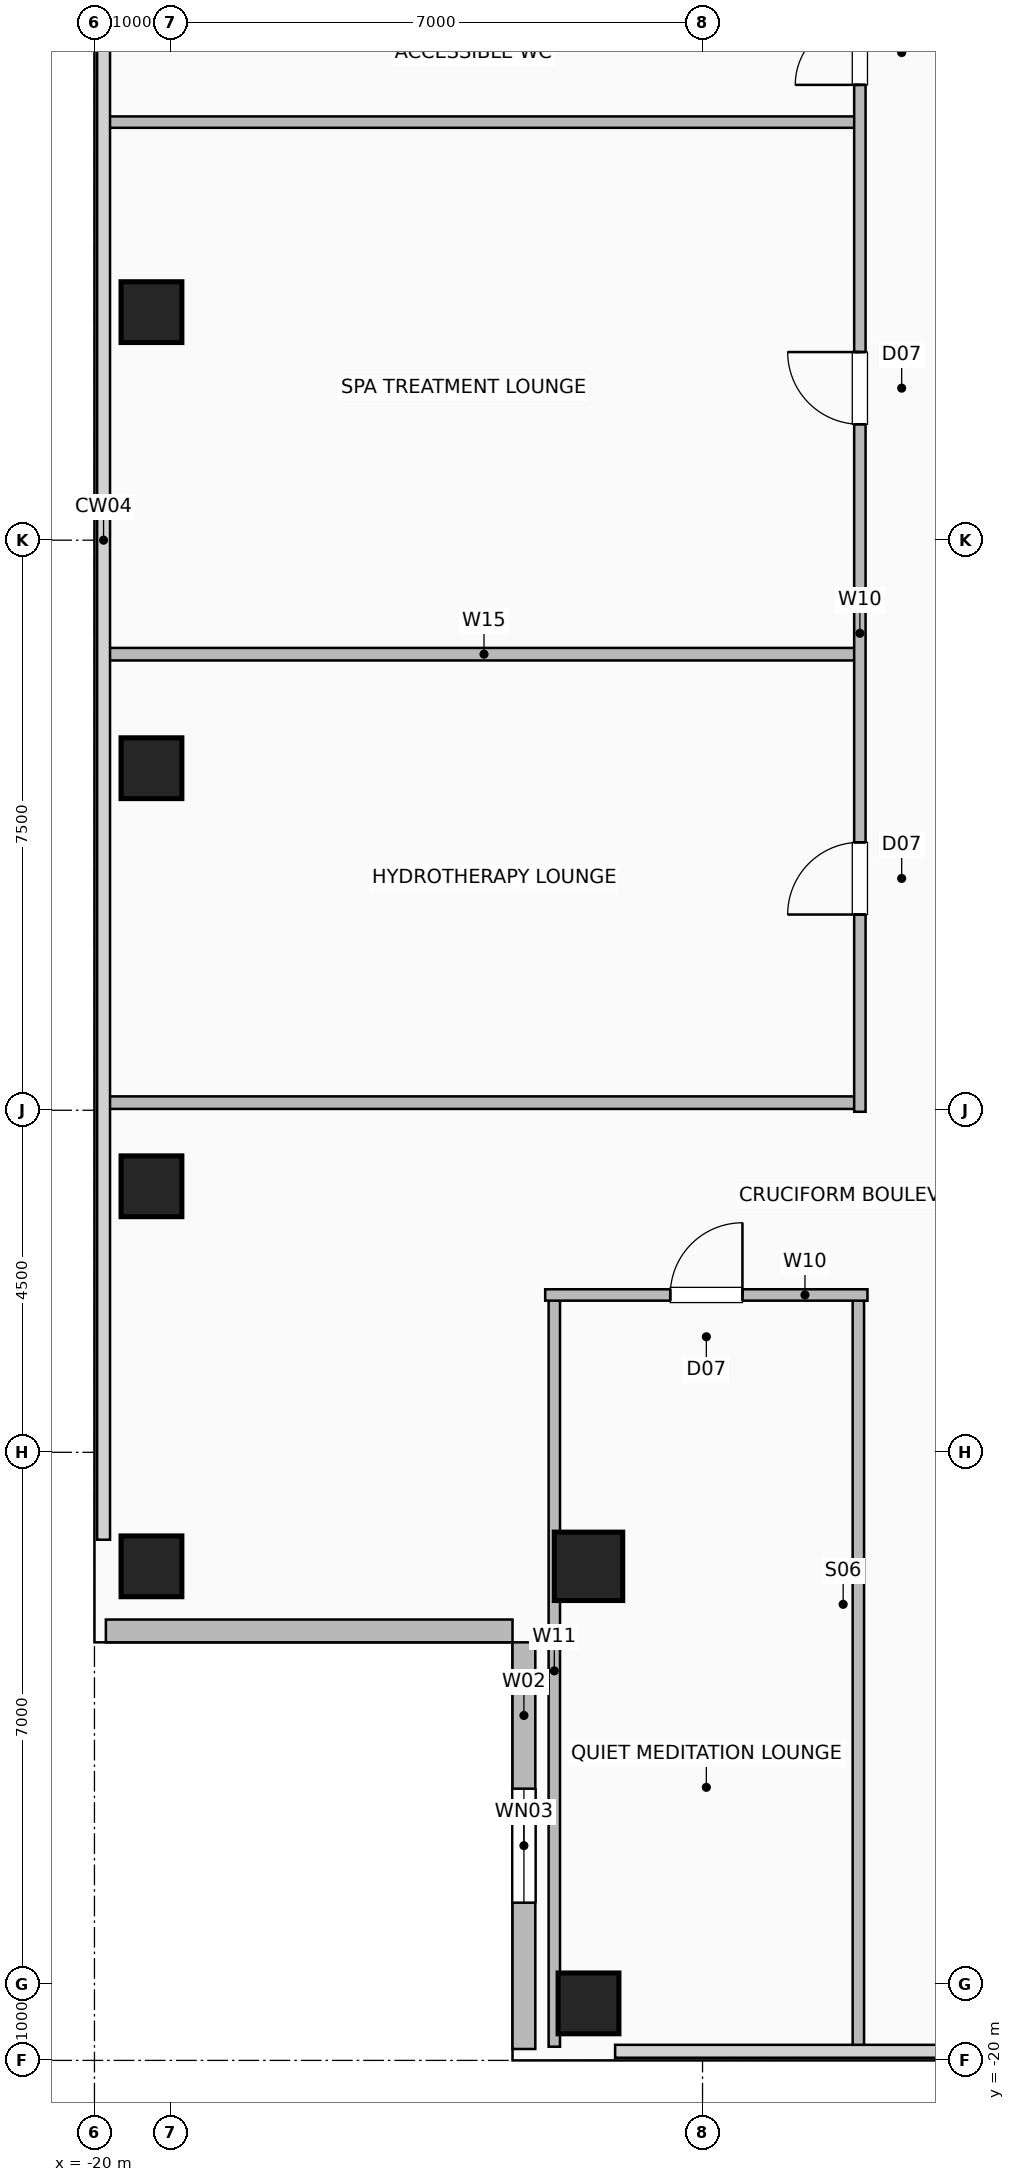
"""IFC4 building model, lengths in metres.
Left out: names, types, materials, properties, quantities, classifications, styles, units other than length and angle.
Written with IfcOpenShell. Run it as: python <this file> out.ifc"""

import sys

from ifc_helpers import new_model, si_unit, direction, frame, frame_2d, origin, origin_2d, place, context, subcontext, project, spatial, rectangle, hollow_rectangle, extrude, element, fill, save


model = new_model("IFC4")
c1 = context("Model", 3, precision=1e-05, world=origin(), true_north=direction((0.0, 1.0)))
c2 = subcontext(c1, "Body", "Model", "MODEL_VIEW")
j1 = project(units=[si_unit("LENGTHUNIT", "METRE"), si_unit("PLANEANGLEUNIT", "RADIAN")], contexts=[c1])
p1 = place(None, origin())
s1 = spatial("IfcSite", under=j1, at=p1, CompositionType="ELEMENT")
p2 = place(p1, origin())
s2 = spatial("IfcBuilding", under=s1, at=p2, CompositionType="ELEMENT")
p3 = place(p2, frame((0.0, 0.0, 209.4)))
s3 = spatial("IfcBuildingStorey", under=s2, at=p3, CompositionType="ELEMENT", Elevation=209.4)
for number, where, z_axis, x_axis in (
    (1, (-13.5, -19.25, 0.0), (0.0, 0.0, 1.0), (1.0, 0.0, 0.0)),
    (2, (-19.25, -13.5, 0.0), (0.0, 0.0, 1.0), (1.0, 0.0, 0.0)),
    (3, (-19.25, -8.5, 0.0), (0.0, 0.0, 1.0), (1.0, 0.0, 0.0)),
    (4, (-19.25, -3.0, 0.0), (0.0, 0.0, 1.0), (1.0, 0.0, 0.0)),
    (5, (-19.25, 3.0, 0.0), (0.0, 0.0, 1.0), (1.0, 0.0, 0.0)),
):
    element("IfcColumn", number, at=place(p3, frame(where, z_axis=z_axis, x_axis=x_axis)), inside=s3, PredefinedType="COLUMN", context=c2, shape_type="SweptSolid", body=[
        extrude(hollow_rectangle(XDim=0.8, YDim=0.8, WallThickness=0.04, at=origin_2d()), origin(), (0.0, 0.0, 1.0), 3.6),
    ])
p4 = place(p3, frame((-13.5, -13.5, 0.0), z_axis=(0.0, 0.0, 1.0), x_axis=(1.0, 0.0, 0.0)))
e6 = element("IfcColumn", 6, at=p4, inside=s3, PredefinedType="COLUMN", context=c2, shape_type="SweptSolid", body=[
    extrude(hollow_rectangle(XDim=0.9, YDim=0.9, WallThickness=0.045, at=origin_2d()), origin(), (0.0, 0.0, 1.0), 3.6),
])
p5 = place(p3, frame((-14.35, -19.85, 0.0), z_axis=(0.0, 0.0, 1.0), x_axis=(0.0, 1.0, 0.0)))
e7 = element("IfcWall", 7, at=p5, inside=s3, PredefinedType="SOLIDWALL", context=c2, shape_type="SweptSolid", body=[
    extrude(rectangle(XDim=5.35, YDim=0.3, at=frame_2d((2.675, 0.0))), origin(), (0.0, 0.0, 1.0), 3.36),
])
p6 = place(p5, frame((1.925, 0.0, 0.9)))
e8 = element("IfcOpeningElement", 8, at=p6, cuts=e7, PredefinedType="OPENING", context=c2, shape_type="SweptSolid", body=[
    extrude(rectangle(XDim=1.5, YDim=1.8, at=frame_2d((0.75, 0.9))), frame((0.0, 0.16, 0.0), z_axis=(0.0, -1.0, 0.0), x_axis=(1.0, 0.0, 0.0)), (0.0, 0.0, 1.0), 0.32),
])
p7 = place(p3, frame((-19.85, -14.35, 0.0), z_axis=(0.0, 0.0, 1.0), x_axis=(1.0, 0.0, 0.0)))
e9 = element("IfcWall", 9, at=p7, inside=s3, PredefinedType="SOLIDWALL", context=c2, shape_type="SweptSolid", body=[
    extrude(rectangle(XDim=5.35, YDim=0.3, at=frame_2d((2.675, 0.0))), origin(), (0.0, 0.0, 1.0), 3.36),
])
for number, where, z_axis, x_axis in (
    (10, (-13.95, -19.82, 0.0), (0.0, 0.0, 1.0), (0.0, 1.0, 0.0)),
    (11, (-9.95, -19.82, 0.0), (0.0, 0.0, 1.0), (0.0, 1.0, 0.0)),
):
    element("IfcWall", number, at=place(p3, frame(where, z_axis=z_axis, x_axis=x_axis)), inside=s3, PredefinedType="PARTITIONING", context=c2, shape_type="SweptSolid", body=[
        extrude(rectangle(XDim=9.89, YDim=0.15, at=frame_2d((4.945, 0.0))), origin(), (0.0, 0.0, 1.0), 3.36),
    ])
p8 = place(p3, frame((-14.07, -9.93, 0.0), z_axis=(0.0, 0.0, 1.0), x_axis=(1.0, 0.0, 0.0)))
e12 = element("IfcWall", 12, at=p8, inside=s3, PredefinedType="PARTITIONING", context=c2, shape_type="SweptSolid", body=[
    extrude(rectangle(XDim=4.24, YDim=0.15, at=frame_2d((2.12, 0.0))), origin(), (0.0, 0.0, 1.0), 3.36),
])
p9 = place(p8, frame((1.645, 0.0, 0.0)))
e13 = element("IfcOpeningElement", 13, at=p9, cuts=e12, PredefinedType="OPENING", context=c2, shape_type="SweptSolid", body=[
    extrude(rectangle(XDim=0.95, YDim=2.06, at=frame_2d((0.475, 1.03))), frame((0.0, 0.085, 0.0), z_axis=(0.0, -1.0, 0.0), x_axis=(1.0, 0.0, 0.0)), (0.0, 0.0, 1.0), 0.17),
])
for number, where, z_axis, x_axis in (
    (14, (-19.82, -7.4, 0.0), (0.0, 0.0, 1.0), (1.0, 0.0, 0.0)),
    (15, (-19.82, -1.5, 0.0), (0.0, 0.0, 1.0), (1.0, 0.0, 0.0)),
):
    element("IfcWall", number, at=place(p3, frame(where, z_axis=z_axis, x_axis=x_axis)), inside=s3, PredefinedType="PLUMBINGWALL", context=c2, shape_type="SweptSolid", body=[
        extrude(rectangle(XDim=9.89, YDim=0.165, at=frame_2d((4.945, 0.0))), origin(), (0.0, 0.0, 1.0), 3.36),
    ])
p10 = place(p3, frame((-19.82, 5.5, 0.0), z_axis=(0.0, 0.0, 1.0), x_axis=(1.0, 0.0, 0.0)))
e16 = element("IfcWall", 16, at=p10, inside=s3, PredefinedType="PARTITIONING", context=c2, shape_type="SweptSolid", body=[
    extrude(rectangle(XDim=9.89, YDim=0.15, at=frame_2d((4.945, 0.0))), origin(), (0.0, 0.0, 1.0), 3.36),
])
p11 = place(p3, frame((-9.93, -7.52, 0.0), z_axis=(0.0, 0.0, 1.0), x_axis=(0.0, 1.0, 0.0)))
e17 = element("IfcWall", 17, at=p11, inside=s3, PredefinedType="PARTITIONING", context=c2, shape_type="SweptSolid", body=[
    extrude(rectangle(XDim=21.59, YDim=0.15, at=frame_2d((10.795, 0.0))), origin(), (0.0, 0.0, 1.0), 3.36),
])
p12 = place(p11, frame((2.595, 0.0, 0.0)))
e18 = element("IfcOpeningElement", 18, at=p12, cuts=e17, PredefinedType="OPENING", context=c2, shape_type="SweptSolid", body=[
    extrude(rectangle(XDim=0.95, YDim=2.06, at=frame_2d((0.475, 1.03))), frame((0.0, 0.085, 0.0), z_axis=(0.0, -1.0, 0.0), x_axis=(1.0, 0.0, 0.0)), (0.0, 0.0, 1.0), 0.17),
])
p13 = place(p11, frame((9.045, 0.0, 0.0)))
e19 = element("IfcOpeningElement", 19, at=p13, cuts=e17, PredefinedType="OPENING", context=c2, shape_type="SweptSolid", body=[
    extrude(rectangle(XDim=0.95, YDim=2.06, at=frame_2d((0.475, 1.03))), frame((0.0, 0.085, 0.0), z_axis=(0.0, -1.0, 0.0), x_axis=(1.0, 0.0, 0.0)), (0.0, 0.0, 1.0), 0.17),
])
p14 = place(p11, frame((13.51, 0.0, 0.0)))
e20 = element("IfcOpeningElement", 20, at=p14, cuts=e17, PredefinedType="OPENING", context=c2, shape_type="SweptSolid", body=[
    extrude(rectangle(XDim=0.85, YDim=2.05, at=frame_2d((0.425, 1.025))), frame((0.0, 0.085, 0.0), z_axis=(0.0, -1.0, 0.0), x_axis=(1.0, 0.0, 0.0)), (0.0, 0.0, 1.0), 0.17),
])
p15 = place(p11, frame((17.685, 0.0, 0.0)))
e21 = element("IfcOpeningElement", 21, at=p15, cuts=e17, PredefinedType="OPENING", context=c2, shape_type="SweptSolid", body=[
    extrude(rectangle(XDim=0.95, YDim=2.06, at=frame_2d((0.475, 1.03))), frame((0.0, 0.085, 0.0), z_axis=(0.0, -1.0, 0.0), x_axis=(1.0, 0.0, 0.0)), (0.0, 0.0, 1.0), 0.17),
])
p16 = place(p6, origin())
e22 = element("IfcWindow", 22, at=p16, inside=s3, PartitioningType="SINGLE_PANEL", PredefinedType="WINDOW", context=c2, shape_type="SweptSolid", body=[
    extrude(rectangle(XDim=1.5, YDim=1.8, at=frame_2d((0.75, 0.9))), frame((0.0, 0.03, 0.0), z_axis=(0.0, -1.0, 0.0), x_axis=(1.0, 0.0, 0.0)), (0.0, 0.0, 1.0), 0.06),
])
fill(e8, e22)
p17 = place(p9, origin())
e23 = element("IfcDoor", 23, at=p17, inside=s3, OperationType="SINGLE_SWING_RIGHT", PredefinedType="DOOR", context=c2, shape_type="SweptSolid", body=[
    extrude(rectangle(XDim=0.95, YDim=2.06, at=frame_2d((0.475, 1.03))), frame((0.0, 0.025, 0.0), z_axis=(0.0, -1.0, 0.0), x_axis=(1.0, 0.0, 0.0)), (0.0, 0.0, 1.0), 0.05),
])
fill(e13, e23)
p18 = place(p12, origin())
e24 = element("IfcDoor", 24, at=p18, inside=s3, OperationType="SINGLE_SWING_LEFT", PredefinedType="DOOR", context=c2, shape_type="SweptSolid", body=[
    extrude(rectangle(XDim=0.95, YDim=2.06, at=frame_2d((0.475, 1.03))), frame((0.0, 0.025, 0.0), z_axis=(0.0, -1.0, 0.0), x_axis=(1.0, 0.0, 0.0)), (0.0, 0.0, 1.0), 0.05),
])
fill(e18, e24)
p19 = place(p13, origin())
e25 = element("IfcDoor", 25, at=p19, inside=s3, OperationType="SINGLE_SWING_RIGHT", PredefinedType="DOOR", context=c2, shape_type="SweptSolid", body=[
    extrude(rectangle(XDim=0.95, YDim=2.06, at=frame_2d((0.475, 1.03))), frame((0.0, 0.025, 0.0), z_axis=(0.0, -1.0, 0.0), x_axis=(1.0, 0.0, 0.0)), (0.0, 0.0, 1.0), 0.05),
])
fill(e19, e25)
p20 = place(p14, origin())
e26 = element("IfcDoor", 26, at=p20, inside=s3, OperationType="SINGLE_SWING_LEFT", PredefinedType="DOOR", context=c2, shape_type="SweptSolid", body=[
    extrude(rectangle(XDim=0.85, YDim=2.05, at=frame_2d((0.425, 1.025))), frame((0.0, 0.025, 0.0), z_axis=(0.0, -1.0, 0.0), x_axis=(1.0, 0.0, 0.0)), (0.0, 0.0, 1.0), 0.05),
])
fill(e20, e26)
save(model, sys.argv[1])
